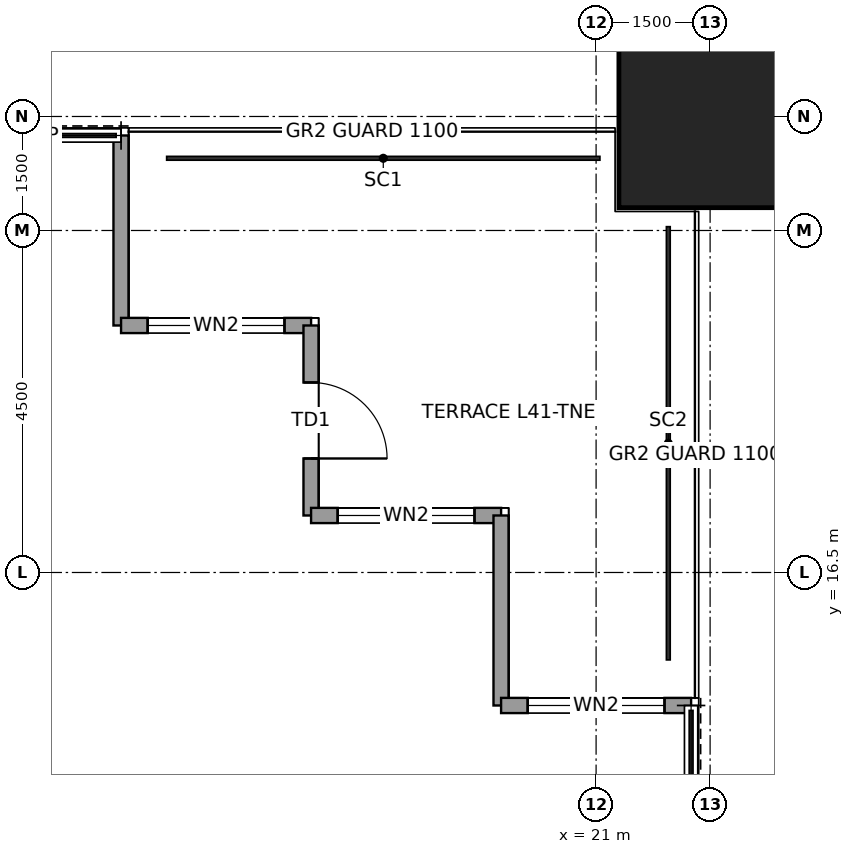
"""IFC4 building model, lengths in metres.
Left out: names, types, materials, properties, quantities, classifications, styles, units other than length and angle.
Written with IfcOpenShell. Run it as: python <this file> out.ifc"""

import sys

from ifc_helpers import new_model, si_unit, direction, frame, frame_2d, origin, origin_2d, place, context, subcontext, project, spatial, rectangle, hollow_rectangle, extrude, element, fill, save


model = new_model("IFC4")
c1 = context("Model", 3, precision=1e-05, world=origin(), true_north=direction((0.0, 1.0)))
c2 = subcontext(c1, "Body", "Model", "MODEL_VIEW")
j1 = project(units=[si_unit("LENGTHUNIT", "METRE"), si_unit("PLANEANGLEUNIT", "RADIAN")], contexts=[c1])
p1 = place(None, origin())
s1 = spatial("IfcSite", under=j1, at=p1, CompositionType="ELEMENT")
p2 = place(p1, origin())
s2 = spatial("IfcBuilding", under=s1, at=p2, CompositionType="ELEMENT")
p3 = place(p2, frame((0.0, 0.0, 197.9)))
s3 = spatial("IfcBuildingStorey", under=s2, at=p3, CompositionType="ELEMENT", Elevation=197.9)
p4 = place(p3, frame((22.5, 22.5, 0.0), z_axis=(0.0, 0.0, 1.0), x_axis=(1.0, 0.0, 0.0)))
e1 = element("IfcColumn", 1, at=p4, inside=s3, PredefinedType="COLUMN", context=c2, shape_type="SweptSolid", body=[
    extrude(hollow_rectangle(XDim=2.4, YDim=2.4, WallThickness=0.12, at=origin_2d()), origin(), (0.0, 0.0, 1.0), 4.0),
])
p5 = place(p3, frame((14.75, 22.25, 0.0), z_axis=(0.0, 0.0, 1.0), x_axis=(0.0, -1.0, 0.0)))
e2 = element("IfcWall", 2, at=p5, inside=s3, PredefinedType="SOLIDWALL", context=c2, shape_type="SweptSolid", body=[
    extrude(rectangle(XDim=2.5, YDim=0.2, at=frame_2d((1.25, 0.0))), origin(), (0.0, 0.0, 1.0), 3.85),
])
p6 = place(p3, frame((14.75, 19.75, 0.0), z_axis=(0.0, 0.0, 1.0), x_axis=(1.0, 0.0, 0.0)))
e3 = element("IfcWall", 3, at=p6, inside=s3, PredefinedType="SOLIDWALL", context=c2, shape_type="SweptSolid", body=[
    extrude(rectangle(XDim=2.5, YDim=0.2, at=frame_2d((1.25, 0.0))), origin(), (0.0, 0.0, 1.0), 3.85),
])
p7 = place(p6, frame((0.35, 0.0, 0.3)))
e4 = element("IfcOpeningElement", 4, at=p7, cuts=e3, PredefinedType="OPENING", context=c2, shape_type="SweptSolid", body=[
    extrude(rectangle(XDim=1.8, YDim=2.4, at=frame_2d((0.9, 1.2))), frame((0.0, 0.11, 0.0), z_axis=(0.0, -1.0, 0.0), x_axis=(1.0, 0.0, 0.0)), (0.0, 0.0, 1.0), 0.22),
])
p8 = place(p3, frame((17.25, 19.75, 0.0), z_axis=(0.0, 0.0, 1.0), x_axis=(0.0, -1.0, 0.0)))
e5 = element("IfcWall", 5, at=p8, inside=s3, PredefinedType="SOLIDWALL", context=c2, shape_type="SweptSolid", body=[
    extrude(rectangle(XDim=2.5, YDim=0.2, at=frame_2d((1.25, 0.0))), origin(), (0.0, 0.0, 1.0), 3.85),
])
p9 = place(p8, frame((0.75, 0.0, 0.0)))
e6 = element("IfcOpeningElement", 6, at=p9, cuts=e5, PredefinedType="OPENING", context=c2, shape_type="SweptSolid", body=[
    extrude(rectangle(XDim=1.0, YDim=2.4, at=frame_2d((0.5, 1.2))), frame((0.0, 0.11, 0.0), z_axis=(0.0, -1.0, 0.0), x_axis=(1.0, 0.0, 0.0)), (0.0, 0.0, 1.0), 0.22),
])
p10 = place(p3, frame((17.25, 17.25, 0.0), z_axis=(0.0, 0.0, 1.0), x_axis=(1.0, 0.0, 0.0)))
e7 = element("IfcWall", 7, at=p10, inside=s3, PredefinedType="SOLIDWALL", context=c2, shape_type="SweptSolid", body=[
    extrude(rectangle(XDim=2.5, YDim=0.2, at=frame_2d((1.25, 0.0))), origin(), (0.0, 0.0, 1.0), 3.85),
])
p11 = place(p10, frame((0.35, 0.0, 0.3)))
e8 = element("IfcOpeningElement", 8, at=p11, cuts=e7, PredefinedType="OPENING", context=c2, shape_type="SweptSolid", body=[
    extrude(rectangle(XDim=1.8, YDim=2.4, at=frame_2d((0.9, 1.2))), frame((0.0, 0.11, 0.0), z_axis=(0.0, -1.0, 0.0), x_axis=(1.0, 0.0, 0.0)), (0.0, 0.0, 1.0), 0.22),
])
p12 = place(p3, frame((19.75, 17.25, 0.0), z_axis=(0.0, 0.0, 1.0), x_axis=(0.0, -1.0, 0.0)))
e9 = element("IfcWall", 9, at=p12, inside=s3, PredefinedType="SOLIDWALL", context=c2, shape_type="SweptSolid", body=[
    extrude(rectangle(XDim=2.5, YDim=0.2, at=frame_2d((1.25, 0.0))), origin(), (0.0, 0.0, 1.0), 3.85),
])
p13 = place(p3, frame((19.75, 14.75, 0.0), z_axis=(0.0, 0.0, 1.0), x_axis=(1.0, 0.0, 0.0)))
e10 = element("IfcWall", 10, at=p13, inside=s3, PredefinedType="SOLIDWALL", context=c2, shape_type="SweptSolid", body=[
    extrude(rectangle(XDim=2.5, YDim=0.2, at=frame_2d((1.25, 0.0))), origin(), (0.0, 0.0, 1.0), 3.85),
])
p14 = place(p13, frame((0.35, 0.0, 0.3)))
e11 = element("IfcOpeningElement", 11, at=p14, cuts=e10, PredefinedType="OPENING", context=c2, shape_type="SweptSolid", body=[
    extrude(rectangle(XDim=1.8, YDim=2.4, at=frame_2d((0.9, 1.2))), frame((0.0, 0.11, 0.0), z_axis=(0.0, -1.0, 0.0), x_axis=(1.0, 0.0, 0.0)), (0.0, 0.0, 1.0), 0.22),
])
p15 = place(p7, origin())
e12 = element("IfcWindow", 12, at=p15, inside=s3, PartitioningType="SINGLE_PANEL", PredefinedType="WINDOW", context=c2, shape_type="SweptSolid", body=[
    extrude(rectangle(XDim=1.8, YDim=2.4, at=frame_2d((0.9, 1.2))), frame((0.0, 0.03, 0.0), z_axis=(0.0, -1.0, 0.0), x_axis=(1.0, 0.0, 0.0)), (0.0, 0.0, 1.0), 0.06),
])
fill(e4, e12)
p16 = place(p9, origin())
e13 = element("IfcDoor", 13, at=p16, inside=s3, OperationType="SINGLE_SWING_RIGHT", PredefinedType="DOOR", context=c2, shape_type="SweptSolid", body=[
    extrude(rectangle(XDim=1.0, YDim=2.4, at=frame_2d((0.5, 1.2))), frame((0.0, 0.025, 0.0), z_axis=(0.0, -1.0, 0.0), x_axis=(1.0, 0.0, 0.0)), (0.0, 0.0, 1.0), 0.05),
])
fill(e6, e13)
p17 = place(p11, origin())
e14 = element("IfcWindow", 14, at=p17, inside=s3, PartitioningType="SINGLE_PANEL", PredefinedType="WINDOW", context=c2, shape_type="SweptSolid", body=[
    extrude(rectangle(XDim=1.8, YDim=2.4, at=frame_2d((0.9, 1.2))), frame((0.0, 0.03, 0.0), z_axis=(0.0, -1.0, 0.0), x_axis=(1.0, 0.0, 0.0)), (0.0, 0.0, 1.0), 0.06),
])
fill(e8, e14)
p18 = place(p14, origin())
e15 = element("IfcWindow", 15, at=p18, inside=s3, PartitioningType="SINGLE_PANEL", PredefinedType="WINDOW", context=c2, shape_type="SweptSolid", body=[
    extrude(rectangle(XDim=1.8, YDim=2.4, at=frame_2d((0.9, 1.2))), frame((0.0, 0.03, 0.0), z_axis=(0.0, -1.0, 0.0), x_axis=(1.0, 0.0, 0.0)), (0.0, 0.0, 1.0), 0.06),
])
fill(e11, e15)
save(model, sys.argv[1])
